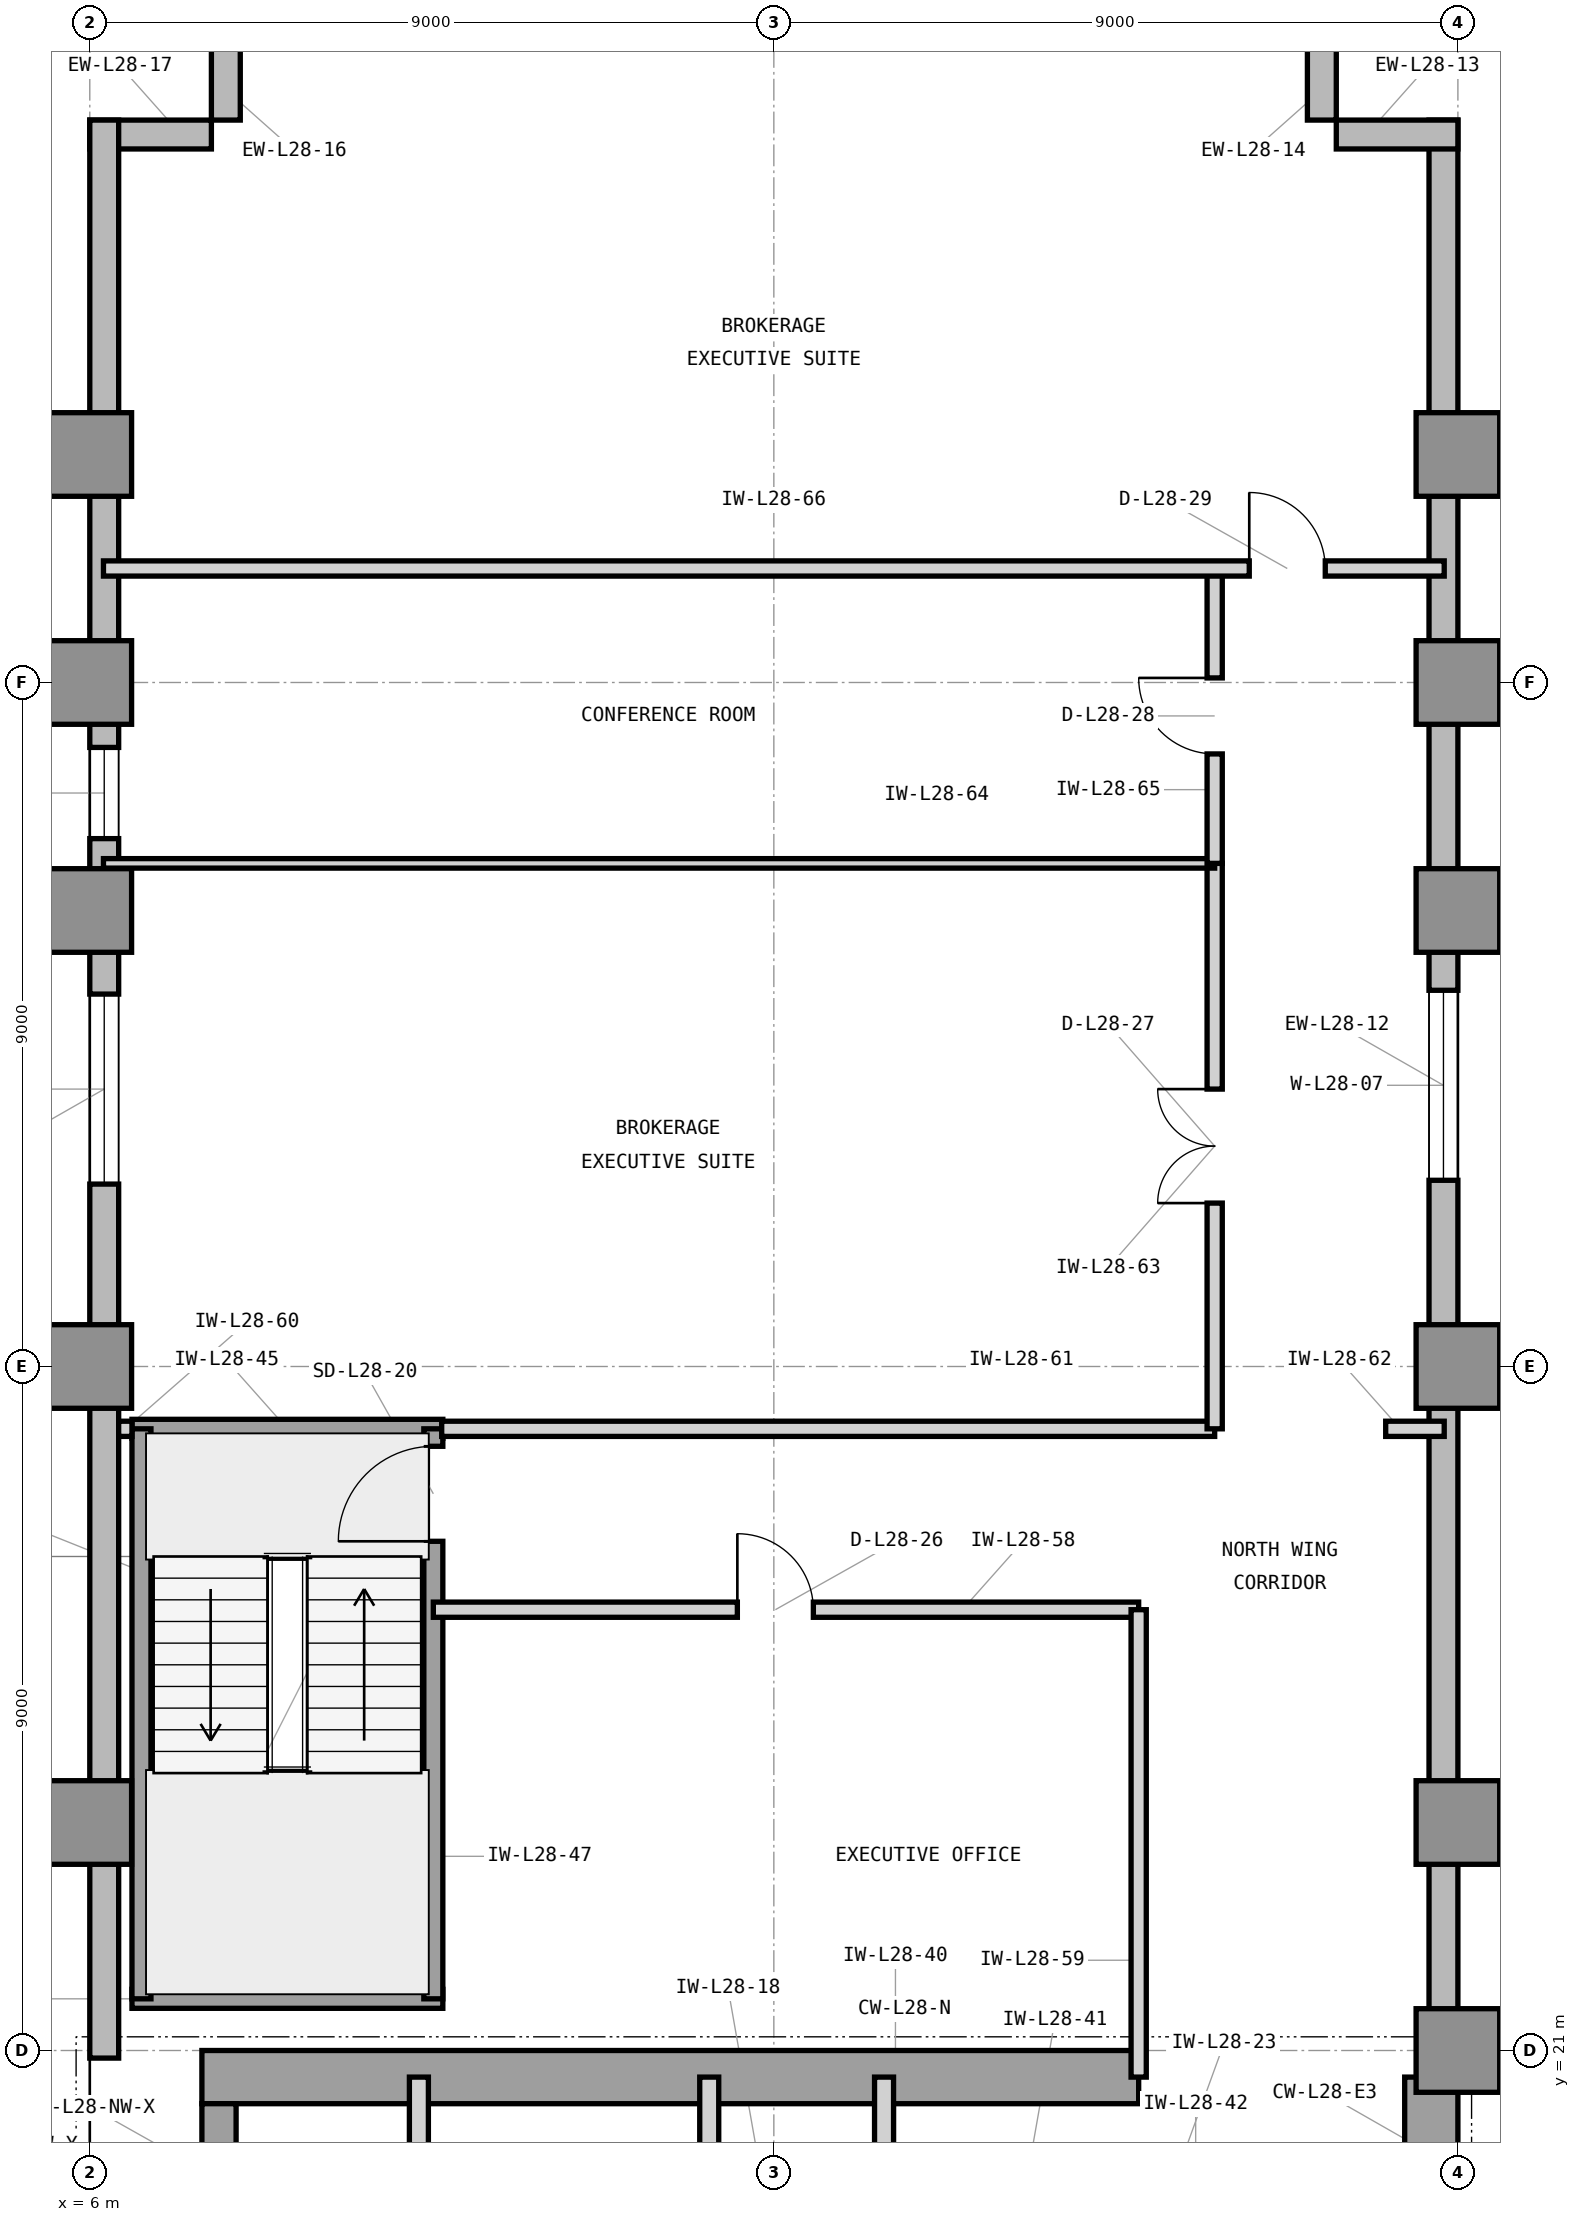
"""IFC4 building model, lengths in metres.
Left out: names, types, materials, properties, quantities, classifications, styles, units other than length and angle.
Written with IfcOpenShell. Run it as: python <this file> out.ifc"""

import sys

from ifc_helpers import new_model, si_unit, direction, frame, frame_2d, origin, origin_2d, place, context, subcontext, project, spatial, rectangle, extrude, element, fill, save


model = new_model("IFC4")
c1 = context("Model", 3, precision=1e-05, world=origin(), true_north=direction((0.0, 1.0)))
c2 = subcontext(c1, "Body", "Model", "MODEL_VIEW")
j1 = project(units=[si_unit("LENGTHUNIT", "METRE"), si_unit("PLANEANGLEUNIT", "RADIAN")], contexts=[c1])
p1 = place(None, origin())
s1 = spatial("IfcSite", under=j1, at=p1, CompositionType="ELEMENT")
p2 = place(p1, origin())
s2 = spatial("IfcBuilding", under=s1, at=p2, CompositionType="ELEMENT")
p3 = place(p2, frame((0.0, 0.0, 120.6)))
s3 = spatial("IfcBuildingStorey", under=s2, at=p3, CompositionType="ELEMENT", Elevation=120.6)
p4 = place(p3, frame((7.475, 20.65, 0.0), z_axis=(0.0, 0.0, 1.0), x_axis=(1.0, 0.0, 0.0)))
e1 = element("IfcWall", 1, at=p4, inside=s3, PredefinedType="SHEAR", context=c2, shape_type="SweptSolid", body=[
    extrude(rectangle(XDim=12.325, YDim=0.7, at=frame_2d((6.163, 0.0))), origin(), (0.0, 0.0, 1.0), 3.9),
])
p5 = place(p3, frame((23.65, 16.6, 0.0), z_axis=(0.0, 0.0, 1.0), x_axis=(0.0, 1.0, 0.0)))
e2 = element("IfcWall", 2, at=p5, inside=s3, PredefinedType="SHEAR", context=c2, shape_type="SweptSolid", body=[
    extrude(rectangle(XDim=4.05, YDim=0.7, at=frame_2d((2.025, 0.0))), origin(), (0.0, 0.0, 1.0), 3.9),
])
p6 = place(p3, frame((7.7, 19.575, 0.0), z_axis=(0.0, 0.0, 1.0), x_axis=(0.0, 1.0, 0.0)))
e3 = element("IfcWall", 3, at=p6, inside=s3, PredefinedType="SHEAR", context=c2, shape_type="SweptSolid", body=[
    extrude(rectangle(XDim=0.725, YDim=0.45, at=frame_2d((0.363, 0.0))), origin(), (0.0, 0.0, 1.0), 3.9),
])
for number, where, z_axis, x_axis in (
    (4, (24.0, 21.0, 0.0), (0.0, 0.0, 1.0), (1.0, 0.0, 0.0)),
    (5, (6.0, 24.0, 0.0), (0.0, 0.0, 1.0), (1.0, 0.0, 0.0)),
    (6, (24.0, 24.0, 0.0), (0.0, 0.0, 1.0), (1.0, 0.0, 0.0)),
    (7, (6.0, 30.0, 0.0), (0.0, 0.0, 1.0), (1.0, 0.0, 0.0)),
    (8, (24.0, 30.0, 0.0), (0.0, 0.0, 1.0), (1.0, 0.0, 0.0)),
    (9, (6.0, 36.0, 0.0), (0.0, 0.0, 1.0), (1.0, 0.0, 0.0)),
    (10, (24.0, 36.0, 0.0), (0.0, 0.0, 1.0), (1.0, 0.0, 0.0)),
    (11, (6.0, 39.0, 0.0), (0.0, 0.0, 1.0), (1.0, 0.0, 0.0)),
    (12, (24.0, 39.0, 0.0), (0.0, 0.0, 1.0), (1.0, 0.0, 0.0)),
    (13, (6.0, 42.0, 0.0), (0.0, 0.0, 1.0), (1.0, 0.0, 0.0)),
    (14, (24.0, 42.0, 0.0), (0.0, 0.0, 1.0), (1.0, 0.0, 0.0)),
):
    element("IfcColumn", number, at=place(p3, frame(where, z_axis=z_axis, x_axis=x_axis)), inside=s3, PredefinedType="COLUMN", context=c2, shape_type="SweptSolid", body=[
        extrude(rectangle(XDim=1.1, YDim=1.1, at=origin_2d()), origin(), (0.0, 0.0, 1.0), 3.9),
    ])
p7 = place(p3, frame((61.4, 20.81, 0.0), z_axis=(0.0, 0.0, 1.0), x_axis=(-1.0, 0.0, 0.0)))
e15 = element("IfcWall", 15, at=p7, inside=s3, PredefinedType="STANDARD", context=c2, shape_type="SweptSolid", body=[
    extrude(rectangle(XDim=37.4, YDim=0.38, at=frame_2d((18.7, 0.0))), origin(), (0.0, 0.0, 1.0), 3.7),
])
p8 = place(p7, frame((15.113, 0.0, 0.85)))
e16 = element("IfcOpeningElement", 16, at=p8, cuts=e15, PredefinedType="OPENING", context=c2, shape_type="SweptSolid", body=[
    extrude(rectangle(XDim=2.5, YDim=2.25, at=frame_2d((1.25, 1.125))), frame((0.0, 0.2, 0.0), z_axis=(0.0, -1.0, 0.0), x_axis=(1.0, 0.0, 0.0)), (0.0, 0.0, 1.0), 0.4),
])
p9 = place(p7, frame((24.462, 0.0, 0.85)))
e17 = element("IfcOpeningElement", 17, at=p9, cuts=e15, PredefinedType="OPENING", context=c2, shape_type="SweptSolid", body=[
    extrude(rectangle(XDim=2.5, YDim=2.25, at=frame_2d((1.25, 1.125))), frame((0.0, 0.2, 0.0), z_axis=(0.0, -1.0, 0.0), x_axis=(1.0, 0.0, 0.0)), (0.0, 0.0, 1.0), 0.4),
])
p10 = place(p3, frame((23.81, 21.0, 0.0), z_axis=(0.0, 0.0, 1.0), x_axis=(0.0, 1.0, 0.0)))
e18 = element("IfcWall", 18, at=p10, inside=s3, PredefinedType="STANDARD", context=c2, shape_type="SweptSolid", body=[
    extrude(rectangle(XDim=25.4, YDim=0.38, at=frame_2d((12.7, 0.0))), origin(), (0.0, 0.0, 1.0), 3.7),
])
p11 = place(p10, frame((11.45, 0.0, 0.85)))
e19 = element("IfcOpeningElement", 19, at=p11, cuts=e18, PredefinedType="OPENING", context=c2, shape_type="SweptSolid", body=[
    extrude(rectangle(XDim=2.5, YDim=2.25, at=frame_2d((1.25, 1.125))), frame((0.0, 0.2, 0.0), z_axis=(0.0, -1.0, 0.0), x_axis=(1.0, 0.0, 0.0)), (0.0, 0.0, 1.0), 0.4),
])
for number, where, z_axis, x_axis in (
    (20, (24.0, 46.21, 0.0), (0.0, 0.0, 1.0), (-1.0, 0.0, 0.0)),
    (21, (22.21, 46.4, 0.0), (0.0, 0.0, 1.0), (0.0, 1.0, 0.0)),
    (22, (7.79, 48.0, 0.0), (0.0, 0.0, 1.0), (0.0, -1.0, 0.0)),
    (23, (7.6, 46.21, 0.0), (0.0, 0.0, 1.0), (-1.0, 0.0, 0.0)),
):
    element("IfcWall", number, at=place(p3, frame(where, z_axis=z_axis, x_axis=x_axis)), inside=s3, PredefinedType="STANDARD", context=c2, shape_type="SweptSolid", body=[
        extrude(rectangle(XDim=1.6, YDim=0.38, at=frame_2d((0.8, 0.0))), origin(), (0.0, 0.0, 1.0), 3.7),
    ])
p12 = place(p3, frame((6.19, 46.4, 0.0), z_axis=(0.0, 0.0, 1.0), x_axis=(0.0, -1.0, 0.0)))
e24 = element("IfcWall", 24, at=p12, inside=s3, PredefinedType="STANDARD", context=c2, shape_type="SweptSolid", body=[
    extrude(rectangle(XDim=25.5, YDim=0.38, at=frame_2d((12.75, 0.0))), origin(), (0.0, 0.0, 1.0), 3.7),
])
p13 = place(p12, frame((11.5, 0.0, 0.85)))
e25 = element("IfcOpeningElement", 25, at=p13, cuts=e24, PredefinedType="OPENING", context=c2, shape_type="SweptSolid", body=[
    extrude(rectangle(XDim=2.5, YDim=2.25, at=frame_2d((1.25, 1.125))), frame((0.0, 0.2, 0.0), z_axis=(0.0, -1.0, 0.0), x_axis=(1.0, 0.0, 0.0)), (0.0, 0.0, 1.0), 0.4),
])
p14 = place(p12, frame((8.254, 0.0, 0.85)))
e26 = element("IfcOpeningElement", 26, at=p14, cuts=e24, PredefinedType="OPENING", context=c2, shape_type="SweptSolid", body=[
    extrude(rectangle(XDim=1.2, YDim=2.25, at=frame_2d((0.6, 1.125))), frame((0.0, 0.2, 0.0), z_axis=(0.0, -1.0, 0.0), x_axis=(1.0, 0.0, 0.0)), (0.0, 0.0, 1.0), 0.4),
])
p15 = place(p3, frame((10.33, 19.45, 0.0), z_axis=(0.0, 0.0, 1.0), x_axis=(0.0, 1.0, 0.0)))
e27 = element("IfcWall", 27, at=p15, inside=s3, PredefinedType="PARTITIONING", context=c2, shape_type="SweptSolid", body=[
    extrude(rectangle(XDim=1.2, YDim=0.25, at=frame_2d((0.6, 0.0))), origin(), (0.0, 0.0, 1.0), 2.917),
])
for number, where, z_axis, x_axis in (
    (28, (14.15, 16.7, 0.0), (0.0, 0.0, 1.0), (0.0, 1.0, 0.0)),
    (29, (16.45, 16.7, 0.0), (0.0, 0.0, 1.0), (0.0, 1.0, 0.0)),
):
    element("IfcWall", number, at=place(p3, frame(where, z_axis=z_axis, x_axis=x_axis)), inside=s3, PredefinedType="PARTITIONING", context=c2, shape_type="SweptSolid", body=[
        extrude(rectangle(XDim=3.95, YDim=0.25, at=frame_2d((1.975, 0.0))), origin(), (0.0, 0.0, 1.0), 3.69),
    ])
for number, where, z_axis, x_axis in (
    (30, (6.555, 21.68, 0.0), (0.0, 0.0, 1.0), (1.0, 0.0, 0.0)),
    (31, (6.555, 29.18, 0.0), (0.0, 0.0, 1.0), (1.0, 0.0, 0.0)),
):
    element("IfcWall", number, at=place(p3, frame(where, z_axis=z_axis, x_axis=x_axis)), inside=s3, PredefinedType="SHEAR", context=c2, shape_type="SweptSolid", body=[
        extrude(rectangle(XDim=4.09, YDim=0.25, at=frame_2d((2.045, 0.0))), origin(), (0.0, 0.0, 1.0), 3.9),
    ])
p16 = place(p3, frame((6.68, 21.68, 0.0), z_axis=(0.0, 0.0, 1.0), x_axis=(0.0, 1.0, 0.0)))
e32 = element("IfcWall", 32, at=p16, inside=s3, PredefinedType="SHEAR", context=c2, shape_type="SweptSolid", body=[
    extrude(rectangle(XDim=7.5, YDim=0.25, at=frame_2d((3.75, 0.0))), origin(), (0.0, 0.0, 1.0), 3.9),
])
p17 = place(p3, frame((10.52, 21.68, 0.0), z_axis=(0.0, 0.0, 1.0), x_axis=(0.0, 1.0, 0.0)))
e33 = element("IfcWall", 33, at=p17, inside=s3, PredefinedType="SHEAR", context=c2, shape_type="SweptSolid", body=[
    extrude(rectangle(XDim=7.5, YDim=0.25, at=frame_2d((3.75, 0.0))), origin(), (0.0, 0.0, 1.0), 3.9),
])
p18 = place(p17, frame((6.02, 0.0, 0.0)))
e34 = element("IfcOpeningElement", 34, at=p18, cuts=e33, PredefinedType="OPENING", context=c2, shape_type="SweptSolid", body=[
    extrude(rectangle(XDim=1.25, YDim=2.2, at=frame_2d((0.625, 1.1))), frame((0.0, 0.135, 0.0), z_axis=(0.0, -1.0, 0.0), x_axis=(1.0, 0.0, 0.0)), (0.0, 0.0, 1.0), 0.27),
])
p19 = place(p3, frame((10.52, 26.8, 0.0), z_axis=(0.0, 0.0, 1.0), x_axis=(1.0, 0.0, 0.0)))
e35 = element("IfcWall", 35, at=p19, inside=s3, PredefinedType="PARTITIONING", context=c2, shape_type="SweptSolid", body=[
    extrude(rectangle(XDim=9.28, YDim=0.2, at=frame_2d((4.64, 0.0))), origin(), (0.0, 0.0, 1.0), 3.69),
])
p20 = place(p19, frame((4.0, 0.0, 0.0)))
e36 = element("IfcOpeningElement", 36, at=p20, cuts=e35, PredefinedType="OPENING", context=c2, shape_type="SweptSolid", body=[
    extrude(rectangle(XDim=1.0, YDim=2.15, at=frame_2d((0.5, 1.075))), frame((0.0, 0.11, 0.0), z_axis=(0.0, -1.0, 0.0), x_axis=(1.0, 0.0, 0.0)), (0.0, 0.0, 1.0), 0.22),
])
p21 = place(p3, frame((19.8, 20.65, 0.0), z_axis=(0.0, 0.0, 1.0), x_axis=(0.0, 1.0, 0.0)))
e37 = element("IfcWall", 37, at=p21, inside=s3, PredefinedType="PARTITIONING", context=c2, shape_type="SweptSolid", body=[
    extrude(rectangle(XDim=6.15, YDim=0.2, at=frame_2d((3.075, 0.0))), origin(), (0.0, 0.0, 1.0), 3.69),
])
p22 = place(p3, frame((6.38, 29.18, 0.0), z_axis=(0.0, 0.0, 1.0), x_axis=(1.0, 0.0, 0.0)))
e38 = element("IfcWall", 38, at=p22, inside=s3, PredefinedType="PARTITIONING", context=c2, shape_type="SweptSolid", body=[
    extrude(rectangle(XDim=0.175, YDim=0.2, at=frame_2d((0.087, 0.0))), origin(), (0.0, 0.0, 1.0), 3.69),
])
p23 = place(p3, frame((10.63, 29.18, 0.0), z_axis=(0.0, 0.0, 1.0), x_axis=(1.0, 0.0, 0.0)))
e39 = element("IfcWall", 39, at=p23, inside=s3, PredefinedType="PARTITIONING", context=c2, shape_type="SweptSolid", body=[
    extrude(rectangle(XDim=10.17, YDim=0.2, at=frame_2d((5.085, 0.0))), origin(), (0.0, 0.0, 1.0), 3.69),
])
p24 = place(p3, frame((23.05, 29.18, 0.0), z_axis=(0.0, 0.0, 1.0), x_axis=(1.0, 0.0, 0.0)))
e40 = element("IfcWall", 40, at=p24, inside=s3, PredefinedType="PARTITIONING", context=c2, shape_type="SweptSolid", body=[
    extrude(rectangle(XDim=0.77, YDim=0.2, at=frame_2d((0.385, 0.0))), origin(), (0.0, 0.0, 1.0), 3.69),
])
p25 = place(p3, frame((20.8, 29.18, 0.0), z_axis=(0.0, 0.0, 1.0), x_axis=(0.0, 1.0, 0.0)))
e41 = element("IfcWall", 41, at=p25, inside=s3, PredefinedType="PARTITIONING", context=c2, shape_type="SweptSolid", body=[
    extrude(rectangle(XDim=7.44, YDim=0.2, at=frame_2d((3.72, 0.0))), origin(), (0.0, 0.0, 1.0), 3.69),
])
p26 = place(p25, frame((2.97, 0.0, 0.0)))
e42 = element("IfcOpeningElement", 42, at=p26, cuts=e41, PredefinedType="OPENING", context=c2, shape_type="SweptSolid", body=[
    extrude(rectangle(XDim=1.5, YDim=2.3, at=frame_2d((0.75, 1.15))), frame((0.0, 0.11, 0.0), z_axis=(0.0, -1.0, 0.0), x_axis=(1.0, 0.0, 0.0)), (0.0, 0.0, 1.0), 0.22),
])
p27 = place(p3, frame((6.18, 36.62, 0.0), z_axis=(0.0, 0.0, 1.0), x_axis=(1.0, 0.0, 0.0)))
e43 = element("IfcWall", 43, at=p27, inside=s3, PredefinedType="PARTITIONING", context=c2, shape_type="SweptSolid", body=[
    extrude(rectangle(XDim=14.62, YDim=0.125, at=frame_2d((7.31, 0.0))), origin(), (0.0, 0.0, 1.0), 3.69),
])
p28 = place(p3, frame((20.8, 36.62, 0.0), z_axis=(0.0, 0.0, 1.0), x_axis=(0.0, 1.0, 0.0)))
e44 = element("IfcWall", 44, at=p28, inside=s3, PredefinedType="PARTITIONING", context=c2, shape_type="SweptSolid", body=[
    extrude(rectangle(XDim=3.88, YDim=0.2, at=frame_2d((1.94, 0.0))), origin(), (0.0, 0.0, 1.0), 3.69),
])
p29 = place(p28, frame((1.44, 0.0, 0.0)))
e45 = element("IfcOpeningElement", 45, at=p29, cuts=e44, PredefinedType="OPENING", context=c2, shape_type="SweptSolid", body=[
    extrude(rectangle(XDim=1.0, YDim=2.15, at=frame_2d((0.5, 1.075))), frame((0.0, 0.11, 0.0), z_axis=(0.0, -1.0, 0.0), x_axis=(1.0, 0.0, 0.0)), (0.0, 0.0, 1.0), 0.22),
])
p30 = place(p3, frame((6.18, 40.5, 0.0), z_axis=(0.0, 0.0, 1.0), x_axis=(1.0, 0.0, 0.0)))
e46 = element("IfcWall", 46, at=p30, inside=s3, PredefinedType="PARTITIONING", context=c2, shape_type="SweptSolid", body=[
    extrude(rectangle(XDim=17.64, YDim=0.2, at=frame_2d((8.82, 0.0))), origin(), (0.0, 0.0, 1.0), 3.69),
])
p31 = place(p30, frame((15.075, 0.0, 0.0)))
e47 = element("IfcOpeningElement", 47, at=p31, cuts=e46, PredefinedType="OPENING", context=c2, shape_type="SweptSolid", body=[
    extrude(rectangle(XDim=1.0, YDim=2.15, at=frame_2d((0.5, 1.075))), frame((0.0, 0.11, 0.0), z_axis=(0.0, -1.0, 0.0), x_axis=(1.0, 0.0, 0.0)), (0.0, 0.0, 1.0), 0.22),
])
p32 = place(p11, origin())
e48 = element("IfcWindow", 48, at=p32, inside=s3, PartitioningType="SINGLE_PANEL", PredefinedType="WINDOW", context=c2, shape_type="SweptSolid", body=[
    extrude(rectangle(XDim=2.5, YDim=2.25, at=frame_2d((1.25, 1.125))), frame((0.0, 0.11, 0.0), z_axis=(0.0, -1.0, 0.0), x_axis=(1.0, 0.0, 0.0)), (0.0, 0.0, 1.0), 0.06),
])
fill(e19, e48)
p33 = place(p13, origin())
e49 = element("IfcWindow", 49, at=p33, inside=s3, PartitioningType="SINGLE_PANEL", PredefinedType="WINDOW", context=c2, shape_type="SweptSolid", body=[
    extrude(rectangle(XDim=2.5, YDim=2.25, at=frame_2d((1.25, 1.125))), frame((0.0, 0.11, 0.0), z_axis=(0.0, -1.0, 0.0), x_axis=(1.0, 0.0, 0.0)), (0.0, 0.0, 1.0), 0.06),
])
fill(e25, e49)
p34 = place(p18, origin())
e50 = element("IfcDoor", 50, at=p34, inside=s3, OperationType="SINGLE_SWING_LEFT", PredefinedType="DOOR", context=c2, shape_type="SweptSolid", body=[
    extrude(rectangle(XDim=1.25, YDim=2.2, at=frame_2d((0.625, 1.1))), frame((0.0, 0.025, 0.0), z_axis=(0.0, -1.0, 0.0), x_axis=(1.0, 0.0, 0.0)), (0.0, 0.0, 1.0), 0.05),
])
fill(e34, e50)
p35 = place(p20, origin())
e51 = element("IfcDoor", 51, at=p35, inside=s3, OperationType="SINGLE_SWING_LEFT", PredefinedType="DOOR", context=c2, shape_type="SweptSolid", body=[
    extrude(rectangle(XDim=1.0, YDim=2.15, at=frame_2d((0.5, 1.075))), frame((0.0, 0.025, 0.0), z_axis=(0.0, -1.0, 0.0), x_axis=(1.0, 0.0, 0.0)), (0.0, 0.0, 1.0), 0.05),
])
fill(e36, e51)
p36 = place(p26, origin())
e52 = element("IfcDoor", 52, at=p36, inside=s3, OperationType="DOUBLE_DOOR_SINGLE_SWING", PredefinedType="DOOR", context=c2, shape_type="SweptSolid", body=[
    extrude(rectangle(XDim=1.5, YDim=2.3, at=frame_2d((0.75, 1.15))), frame((0.0, 0.025, 0.0), z_axis=(0.0, -1.0, 0.0), x_axis=(1.0, 0.0, 0.0)), (0.0, 0.0, 1.0), 0.05),
])
fill(e42, e52)
p37 = place(p29, origin())
e53 = element("IfcDoor", 53, at=p37, inside=s3, OperationType="SINGLE_SWING_RIGHT", PredefinedType="DOOR", context=c2, shape_type="SweptSolid", body=[
    extrude(rectangle(XDim=1.0, YDim=2.15, at=frame_2d((0.5, 1.075))), frame((0.0, 0.025, 0.0), z_axis=(0.0, -1.0, 0.0), x_axis=(1.0, 0.0, 0.0)), (0.0, 0.0, 1.0), 0.05),
])
fill(e45, e53)
p38 = place(p31, origin())
e54 = element("IfcDoor", 54, at=p38, inside=s3, OperationType="SINGLE_SWING_LEFT", PredefinedType="DOOR", context=c2, shape_type="SweptSolid", body=[
    extrude(rectangle(XDim=1.0, YDim=2.15, at=frame_2d((0.5, 1.075))), frame((0.0, 0.025, 0.0), z_axis=(0.0, -1.0, 0.0), x_axis=(1.0, 0.0, 0.0)), (0.0, 0.0, 1.0), 0.05),
])
fill(e47, e54)
p39 = place(p14, origin())
e55 = element("IfcWindow", 55, at=p39, inside=s3, PartitioningType="SINGLE_PANEL", PredefinedType="WINDOW", context=c2, shape_type="SweptSolid", body=[
    extrude(rectangle(XDim=1.2, YDim=2.25, at=frame_2d((0.6, 1.125))), frame((0.0, 0.11, 0.0), z_axis=(0.0, -1.0, 0.0), x_axis=(1.0, 0.0, 0.0)), (0.0, 0.0, 1.0), 0.06),
])
fill(e26, e55)
save(model, sys.argv[1])
